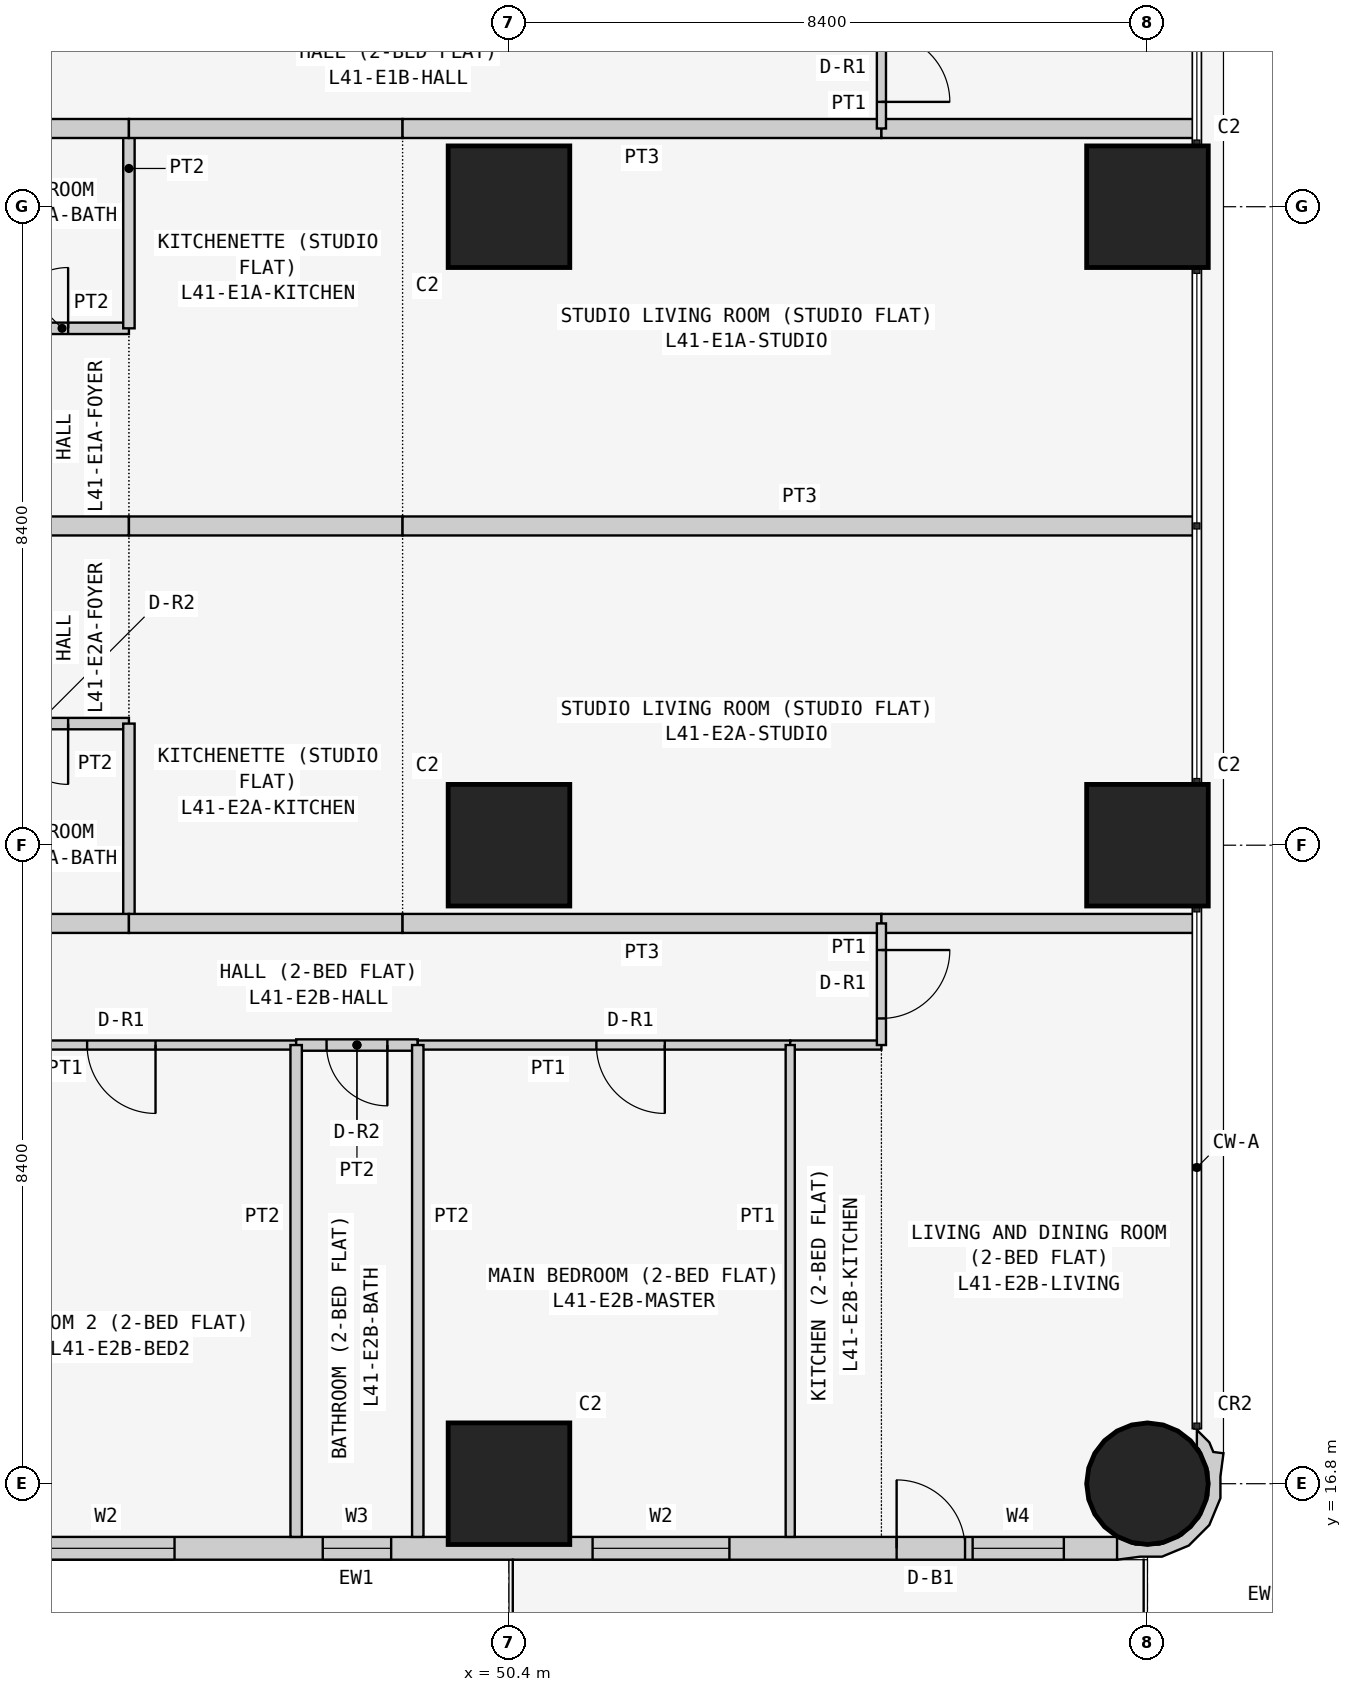
"""IFC4 building model, lengths in metres.
Left out: names, types, materials, properties, quantities, classifications, styles, units other than length and angle.
Written with IfcOpenShell. Run it as: python <this file> out.ifc"""

import sys

from ifc_helpers import new_model, si_unit, direction, frame, frame_2d, origin, origin_2d, place, context, subcontext, project, spatial, polyline, rectangle, circle, outline, extrude, element, fill, save


model = new_model("IFC4")
c1 = context("Model", 3, precision=1e-05, world=origin(), true_north=direction((0.0, 1.0)))
c2 = subcontext(c1, "Body", "Model", "MODEL_VIEW")
j1 = project(units=[si_unit("LENGTHUNIT", "METRE"), si_unit("PLANEANGLEUNIT", "RADIAN")], contexts=[c1])
p1 = place(None, origin())
s1 = spatial("IfcSite", under=j1, at=p1, CompositionType="ELEMENT")
p2 = place(p1, origin())
s2 = spatial("IfcBuilding", under=s1, at=p2, CompositionType="ELEMENT")
p3 = place(p2, frame((0.0, 0.0, 159.3)))
s3 = spatial("IfcBuildingStorey", under=s2, at=p3, CompositionType="ELEMENT", Elevation=159.3)
for number, where, z_axis, x_axis in (
    (1, (50.4, 16.8, 0.0), (0.0, 0.0, 1.0), (1.0, 0.0, 0.0)),
    (2, (50.4, 25.2, 0.0), (0.0, 0.0, 1.0), (1.0, 0.0, 0.0)),
    (3, (50.4, 33.6, 0.0), (0.0, 0.0, 1.0), (1.0, 0.0, 0.0)),
):
    element("IfcColumn", number, at=place(p3, frame(where, z_axis=z_axis, x_axis=x_axis)), inside=s3, PredefinedType="COLUMN", context=c2, shape_type="SweptSolid", body=[
        extrude(rectangle(XDim=1.6, YDim=1.6, at=origin_2d()), origin(), (0.0, 0.0, 1.0), 3.6),
    ])
p4 = place(p3, frame((58.8, 16.8, 0.0), z_axis=(0.0, 0.0, 1.0), x_axis=(1.0, 0.0, 0.0)))
e4 = element("IfcColumn", 4, at=p4, inside=s3, PredefinedType="COLUMN", context=c2, shape_type="SweptSolid", body=[
    extrude(circle(Radius=0.8, at=origin_2d()), origin(), (0.0, 0.0, 1.0), 3.6),
])
for number, where, z_axis, x_axis in (
    (5, (58.8, 25.2, 0.0), (0.0, 0.0, 1.0), (1.0, 0.0, 0.0)),
    (6, (58.8, 33.6, 0.0), (0.0, 0.0, 1.0), (1.0, 0.0, 0.0)),
):
    element("IfcColumn", number, at=place(p3, frame(where, z_axis=z_axis, x_axis=x_axis)), inside=s3, PredefinedType="COLUMN", context=c2, shape_type="SweptSolid", body=[
        extrude(rectangle(XDim=1.6, YDim=1.6, at=origin_2d()), origin(), (0.0, 0.0, 1.0), 3.6),
    ])
p5 = place(p3, frame((43.0, 15.95, 0.0), z_axis=(0.0, 0.0, 1.0), x_axis=(1.0, 0.0, 0.0)))
e7 = element("IfcWall", 7, at=p5, inside=s3, PredefinedType="SOLIDWALL", context=c2, shape_type="SweptSolid", body=[
    extrude(rectangle(XDim=15.4, YDim=0.3, at=frame_2d((7.7, 0.0))), origin(), (0.0, 0.0, 1.0), 3.45),
])
p6 = place(p5, frame((1.2, 0.0, 0.9)))
e8 = element("IfcOpeningElement", 8, at=p6, cuts=e7, PredefinedType="OPENING", context=c2, shape_type="SweptSolid", body=[
    extrude(rectangle(XDim=1.8, YDim=1.5, at=frame_2d((0.9, 0.75))), frame((0.0, 0.16, 0.0), z_axis=(0.0, -1.0, 0.0), x_axis=(1.0, 0.0, 0.0)), (0.0, 0.0, 1.0), 0.32),
])
p7 = place(p5, frame((4.95, 0.0, 1.5)))
e9 = element("IfcOpeningElement", 9, at=p7, cuts=e7, PredefinedType="OPENING", context=c2, shape_type="SweptSolid", body=[
    extrude(rectangle(XDim=0.9, YDim=0.7, at=frame_2d((0.45, 0.35))), frame((0.0, 0.16, 0.0), z_axis=(0.0, -1.0, 0.0), x_axis=(1.0, 0.0, 0.0)), (0.0, 0.0, 1.0), 0.32),
])
p8 = place(p5, frame((8.5, 0.0, 0.9)))
e10 = element("IfcOpeningElement", 10, at=p8, cuts=e7, PredefinedType="OPENING", context=c2, shape_type="SweptSolid", body=[
    extrude(rectangle(XDim=1.8, YDim=1.5, at=frame_2d((0.9, 0.75))), frame((0.0, 0.16, 0.0), z_axis=(0.0, -1.0, 0.0), x_axis=(1.0, 0.0, 0.0)), (0.0, 0.0, 1.0), 0.32),
])
p9 = place(p5, frame((12.5, 0.0, 0.0)))
e11 = element("IfcOpeningElement", 11, at=p9, cuts=e7, PredefinedType="OPENING", context=c2, shape_type="SweptSolid", body=[
    extrude(rectangle(XDim=0.9, YDim=2.4, at=frame_2d((0.45, 1.2))), frame((0.0, 0.16, 0.0), z_axis=(0.0, -1.0, 0.0), x_axis=(1.0, 0.0, 0.0)), (0.0, 0.0, 1.0), 0.32),
])
p10 = place(p5, frame((13.5, 0.0, 0.9)))
e12 = element("IfcOpeningElement", 12, at=p10, cuts=e7, PredefinedType="OPENING", context=c2, shape_type="SweptSolid", body=[
    extrude(rectangle(XDim=1.2, YDim=1.5, at=frame_2d((0.6, 0.75))), frame((0.0, 0.16, 0.0), z_axis=(0.0, -1.0, 0.0), x_axis=(1.0, 0.0, 0.0)), (0.0, 0.0, 1.0), 0.32),
])
p11 = place(p3, frame((58.473, 15.983, 0.0), z_axis=(0.0, 0.0, 1.0), x_axis=(0.93923434088, -0.343276641956, 0.0)))
e13 = element("IfcWall", 13, at=p11, inside=s3, PredefinedType="SOLIDWALL", context=c2, shape_type="SweptSolid", body=[
    extrude(outline(polyline([(0.828, 1.599), (0.697, 1.569), (0.604, 1.67), (0.394, 1.767), (0.471, 1.556), (0.508, 1.539), (0.724, 1.304), (0.834, 1.005), (0.82, 0.686), (0.686, 0.397), (0.451, 0.182), (0.152, 0.073), (-0.116, 0.084), (-0.127, 0.078), (-0.146, 0.071), (-0.006, -0.197), (0.266, -0.055), (0.535, 0.044), (0.817, 0.302), (0.978, 0.648), (0.994, 1.03), (0.895, 1.3), (0.828, 1.599)])), origin(), (0.0, 0.0, 1.0), 3.45),
])
p12 = place(p3, frame((45.4, 32.0, 0.0), z_axis=(0.0, 0.0, 1.0), x_axis=(-1.0, 0.0, 0.0)))
e14 = element("IfcWall", 14, at=p12, inside=s3, PredefinedType="PARTITIONING", context=c2, shape_type="SweptSolid", body=[
    extrude(rectangle(XDim=2.475, YDim=0.15, at=frame_2d((1.237, 0.0))), origin(), (0.0, 0.0, 1.0), 3.45),
])
p13 = place(p12, frame((0.8, 0.0, 0.0)))
e15 = element("IfcOpeningElement", 15, at=p13, cuts=e14, PredefinedType="OPENING", context=c2, shape_type="SweptSolid", body=[
    extrude(rectangle(XDim=0.8, YDim=2.1, at=frame_2d((0.4, 1.05))), frame((0.0, 0.085, 0.0), z_axis=(0.0, -1.0, 0.0), x_axis=(1.0, 0.0, 0.0)), (0.0, 0.0, 1.0), 0.17),
])
p14 = place(p3, frame((42.925, 29.4, 0.0), z_axis=(0.0, 0.0, 1.0), x_axis=(1.0, 0.0, 0.0)))
e16 = element("IfcWall", 16, at=p14, inside=s3, PredefinedType="PARTITIONING", context=c2, shape_type="SweptSolid", body=[
    extrude(rectangle(XDim=2.475, YDim=0.25, at=frame_2d((1.237, 0.0))), origin(), (0.0, 0.0, 1.0), 3.45),
])
p15 = place(p3, frame((45.4, 32.0, 0.0), z_axis=(0.0, 0.0, 1.0), x_axis=(0.0, 1.0, 0.0)))
e17 = element("IfcWall", 17, at=p15, inside=s3, PredefinedType="PARTITIONING", context=c2, shape_type="SweptSolid", body=[
    extrude(rectangle(XDim=2.629, YDim=0.15, at=frame_2d((1.314, 0.0))), origin(), (0.0, 0.0, 1.0), 3.45),
])
p16 = place(p3, frame((45.4, 34.629, 0.0), z_axis=(0.0, 0.0, 1.0), x_axis=(-1.0, 0.0, 0.0)))
e18 = element("IfcWall", 18, at=p16, inside=s3, PredefinedType="PARTITIONING", context=c2, shape_type="SweptSolid", body=[
    extrude(rectangle(XDim=2.475, YDim=0.25, at=frame_2d((1.237, 0.0))), origin(), (0.0, 0.0, 1.0), 3.45),
])
for number, where, z_axis, x_axis in (
    (19, (49.0, 34.629, 0.0), (0.0, 0.0, 1.0), (-1.0, 0.0, 0.0)),
    (20, (45.4, 29.4, 0.0), (0.0, 0.0, 1.0), (1.0, 0.0, 0.0)),
):
    element("IfcWall", number, at=place(p3, frame(where, z_axis=z_axis, x_axis=x_axis)), inside=s3, PredefinedType="PARTITIONING", context=c2, shape_type="SweptSolid", body=[
        extrude(rectangle(XDim=3.6, YDim=0.25, at=frame_2d((1.8, 0.0))), origin(), (0.0, 0.0, 1.0), 3.45),
    ])
p17 = place(p3, frame((55.3, 34.629, 0.0), z_axis=(0.0, 0.0, 1.0), x_axis=(-1.0, 0.0, 0.0)))
e21 = element("IfcWall", 21, at=p17, inside=s3, PredefinedType="PARTITIONING", context=c2, shape_type="SweptSolid", body=[
    extrude(rectangle(XDim=6.3, YDim=0.25, at=frame_2d((3.15, 0.0))), origin(), (0.0, 0.0, 1.0), 3.45),
])
p18 = place(p3, frame((59.45, 34.629, 0.0), z_axis=(0.0, 0.0, 1.0), x_axis=(-1.0, 0.0, 0.0)))
e22 = element("IfcWall", 22, at=p18, inside=s3, PredefinedType="PARTITIONING", context=c2, shape_type="SweptSolid", body=[
    extrude(rectangle(XDim=4.15, YDim=0.25, at=frame_2d((2.075, 0.0))), origin(), (0.0, 0.0, 1.0), 3.45),
])
p19 = place(p3, frame((49.0, 29.4, 0.0), z_axis=(0.0, 0.0, 1.0), x_axis=(1.0, 0.0, 0.0)))
e23 = element("IfcWall", 23, at=p19, inside=s3, PredefinedType="PARTITIONING", context=c2, shape_type="SweptSolid", body=[
    extrude(rectangle(XDim=10.45, YDim=0.25, at=frame_2d((5.225, 0.0))), origin(), (0.0, 0.0, 1.0), 3.45),
])
p20 = place(p3, frame((55.3, 34.629, 0.0), z_axis=(0.0, 0.0, 1.0), x_axis=(0.0, 1.0, 0.0)))
e24 = element("IfcWall", 24, at=p20, inside=s3, PredefinedType="PARTITIONING", context=c2, shape_type="SweptSolid", body=[
    extrude(rectangle(XDim=1.6, YDim=0.12, at=frame_2d((0.8, 0.0))), origin(), (0.0, 0.0, 1.0), 3.45),
])
p21 = place(p20, frame((0.35, 0.0, 0.0)))
e25 = element("IfcOpeningElement", 25, at=p21, cuts=e24, PredefinedType="OPENING", context=c2, shape_type="SweptSolid", body=[
    extrude(rectangle(XDim=0.9, YDim=2.1, at=frame_2d((0.45, 1.05))), frame((0.0, 0.07, 0.0), z_axis=(0.0, -1.0, 0.0), x_axis=(1.0, 0.0, 0.0)), (0.0, 0.0, 1.0), 0.14),
])
p22 = place(p3, frame((45.4, 26.8, 0.0), z_axis=(0.0, 0.0, 1.0), x_axis=(-1.0, 0.0, 0.0)))
e26 = element("IfcWall", 26, at=p22, inside=s3, PredefinedType="PARTITIONING", context=c2, shape_type="SweptSolid", body=[
    extrude(rectangle(XDim=2.475, YDim=0.15, at=frame_2d((1.237, 0.0))), origin(), (0.0, 0.0, 1.0), 3.45),
])
p23 = place(p22, frame((0.8, 0.0, 0.0)))
e27 = element("IfcOpeningElement", 27, at=p23, cuts=e26, PredefinedType="OPENING", context=c2, shape_type="SweptSolid", body=[
    extrude(rectangle(XDim=0.8, YDim=2.1, at=frame_2d((0.4, 1.05))), frame((0.0, 0.085, 0.0), z_axis=(0.0, -1.0, 0.0), x_axis=(1.0, 0.0, 0.0)), (0.0, 0.0, 1.0), 0.17),
])
p24 = place(p3, frame((45.4, 26.8, 0.0), z_axis=(0.0, 0.0, 1.0), x_axis=(0.0, -1.0, 0.0)))
e28 = element("IfcWall", 28, at=p24, inside=s3, PredefinedType="PARTITIONING", context=c2, shape_type="SweptSolid", body=[
    extrude(rectangle(XDim=2.629, YDim=0.15, at=frame_2d((1.314, 0.0))), origin(), (0.0, 0.0, 1.0), 3.45),
])
p25 = place(p3, frame((45.4, 24.171, 0.0), z_axis=(0.0, 0.0, 1.0), x_axis=(-1.0, 0.0, 0.0)))
e29 = element("IfcWall", 29, at=p25, inside=s3, PredefinedType="PARTITIONING", context=c2, shape_type="SweptSolid", body=[
    extrude(rectangle(XDim=2.475, YDim=0.25, at=frame_2d((1.237, 0.0))), origin(), (0.0, 0.0, 1.0), 3.45),
])
p26 = place(p3, frame((49.0, 24.171, 0.0), z_axis=(0.0, 0.0, 1.0), x_axis=(-1.0, 0.0, 0.0)))
e30 = element("IfcWall", 30, at=p26, inside=s3, PredefinedType="PARTITIONING", context=c2, shape_type="SweptSolid", body=[
    extrude(rectangle(XDim=3.6, YDim=0.25, at=frame_2d((1.8, 0.0))), origin(), (0.0, 0.0, 1.0), 3.45),
])
p27 = place(p3, frame((55.3, 24.171, 0.0), z_axis=(0.0, 0.0, 1.0), x_axis=(-1.0, 0.0, 0.0)))
e31 = element("IfcWall", 31, at=p27, inside=s3, PredefinedType="PARTITIONING", context=c2, shape_type="SweptSolid", body=[
    extrude(rectangle(XDim=6.3, YDim=0.25, at=frame_2d((3.15, 0.0))), origin(), (0.0, 0.0, 1.0), 3.45),
])
p28 = place(p3, frame((59.45, 24.171, 0.0), z_axis=(0.0, 0.0, 1.0), x_axis=(-1.0, 0.0, 0.0)))
e32 = element("IfcWall", 32, at=p28, inside=s3, PredefinedType="PARTITIONING", context=c2, shape_type="SweptSolid", body=[
    extrude(rectangle(XDim=4.15, YDim=0.25, at=frame_2d((2.075, 0.0))), origin(), (0.0, 0.0, 1.0), 3.45),
])
p29 = place(p3, frame((47.6, 22.571, 0.0), z_axis=(0.0, 0.0, 1.0), x_axis=(-1.0, 0.0, 0.0)))
e33 = element("IfcWall", 33, at=p29, inside=s3, PredefinedType="PARTITIONING", context=c2, shape_type="SweptSolid", body=[
    extrude(rectangle(XDim=4.675, YDim=0.12, at=frame_2d((2.337, 0.0))), origin(), (0.0, 0.0, 1.0), 3.45),
])
p30 = place(p29, frame((1.85, 0.0, 0.0)))
e34 = element("IfcOpeningElement", 34, at=p30, cuts=e33, PredefinedType="OPENING", context=c2, shape_type="SweptSolid", body=[
    extrude(rectangle(XDim=0.9, YDim=2.1, at=frame_2d((0.45, 1.05))), frame((0.0, 0.07, 0.0), z_axis=(0.0, -1.0, 0.0), x_axis=(1.0, 0.0, 0.0)), (0.0, 0.0, 1.0), 0.14),
])
p31 = place(p3, frame((49.2, 22.571, 0.0), z_axis=(0.0, 0.0, 1.0), x_axis=(-1.0, 0.0, 0.0)))
e35 = element("IfcWall", 35, at=p31, inside=s3, PredefinedType="PARTITIONING", context=c2, shape_type="SweptSolid", body=[
    extrude(rectangle(XDim=1.6, YDim=0.15, at=frame_2d((0.8, 0.0))), origin(), (0.0, 0.0, 1.0), 3.45),
])
p32 = place(p31, frame((0.4, 0.0, 0.0)))
e36 = element("IfcOpeningElement", 36, at=p32, cuts=e35, PredefinedType="OPENING", context=c2, shape_type="SweptSolid", body=[
    extrude(rectangle(XDim=0.8, YDim=2.1, at=frame_2d((0.4, 1.05))), frame((0.0, 0.085, 0.0), z_axis=(0.0, -1.0, 0.0), x_axis=(1.0, 0.0, 0.0)), (0.0, 0.0, 1.0), 0.17),
])
p33 = place(p3, frame((54.1, 22.571, 0.0), z_axis=(0.0, 0.0, 1.0), x_axis=(-1.0, 0.0, 0.0)))
e37 = element("IfcWall", 37, at=p33, inside=s3, PredefinedType="PARTITIONING", context=c2, shape_type="SweptSolid", body=[
    extrude(rectangle(XDim=4.9, YDim=0.12, at=frame_2d((2.45, 0.0))), origin(), (0.0, 0.0, 1.0), 3.45),
])
p34 = place(p33, frame((1.65, 0.0, 0.0)))
e38 = element("IfcOpeningElement", 38, at=p34, cuts=e37, PredefinedType="OPENING", context=c2, shape_type="SweptSolid", body=[
    extrude(rectangle(XDim=0.9, YDim=2.1, at=frame_2d((0.45, 1.05))), frame((0.0, 0.07, 0.0), z_axis=(0.0, -1.0, 0.0), x_axis=(1.0, 0.0, 0.0)), (0.0, 0.0, 1.0), 0.14),
])
p35 = place(p3, frame((55.3, 22.571, 0.0), z_axis=(0.0, 0.0, 1.0), x_axis=(-1.0, 0.0, 0.0)))
e39 = element("IfcWall", 39, at=p35, inside=s3, PredefinedType="PARTITIONING", context=c2, shape_type="SweptSolid", body=[
    extrude(rectangle(XDim=1.2, YDim=0.12, at=frame_2d((0.6, 0.0))), origin(), (0.0, 0.0, 1.0), 3.45),
])
p36 = place(p3, frame((55.3, 24.171, 0.0), z_axis=(0.0, 0.0, 1.0), x_axis=(0.0, -1.0, 0.0)))
e40 = element("IfcWall", 40, at=p36, inside=s3, PredefinedType="PARTITIONING", context=c2, shape_type="SweptSolid", body=[
    extrude(rectangle(XDim=1.6, YDim=0.12, at=frame_2d((0.8, 0.0))), origin(), (0.0, 0.0, 1.0), 3.45),
])
p37 = place(p36, frame((0.35, 0.0, 0.0)))
e41 = element("IfcOpeningElement", 41, at=p37, cuts=e40, PredefinedType="OPENING", context=c2, shape_type="SweptSolid", body=[
    extrude(rectangle(XDim=0.9, YDim=2.1, at=frame_2d((0.45, 1.05))), frame((0.0, 0.07, 0.0), z_axis=(0.0, -1.0, 0.0), x_axis=(1.0, 0.0, 0.0)), (0.0, 0.0, 1.0), 0.14),
])
for number, where, z_axis, x_axis in (
    (42, (47.6, 22.571, 0.0), (0.0, 0.0, 1.0), (0.0, -1.0, 0.0)),
    (43, (49.2, 22.571, 0.0), (0.0, 0.0, 1.0), (0.0, -1.0, 0.0)),
):
    element("IfcWall", number, at=place(p3, frame(where, z_axis=z_axis, x_axis=x_axis)), inside=s3, PredefinedType="PARTITIONING", context=c2, shape_type="SweptSolid", body=[
        extrude(rectangle(XDim=6.471, YDim=0.15, at=frame_2d((3.235, 0.0))), origin(), (0.0, 0.0, 1.0), 3.45),
    ])
p38 = place(p3, frame((54.1, 22.571, 0.0), z_axis=(0.0, 0.0, 1.0), x_axis=(0.0, -1.0, 0.0)))
e44 = element("IfcWall", 44, at=p38, inside=s3, PredefinedType="PARTITIONING", context=c2, shape_type="SweptSolid", body=[
    extrude(rectangle(XDim=6.471, YDim=0.12, at=frame_2d((3.235, 0.0))), origin(), (0.0, 0.0, 1.0), 3.45),
])
p39 = place(p6, origin())
e45 = element("IfcWindow", 45, at=p39, inside=s3, PartitioningType="SINGLE_PANEL", PredefinedType="WINDOW", context=c2, shape_type="SweptSolid", body=[
    extrude(rectangle(XDim=1.8, YDim=1.5, at=frame_2d((0.9, 0.75))), frame((0.0, 0.03, 0.0), z_axis=(0.0, -1.0, 0.0), x_axis=(1.0, 0.0, 0.0)), (0.0, 0.0, 1.0), 0.06),
])
fill(e8, e45)
p40 = place(p7, origin())
e46 = element("IfcWindow", 46, at=p40, inside=s3, PartitioningType="SINGLE_PANEL", PredefinedType="WINDOW", context=c2, shape_type="SweptSolid", body=[
    extrude(rectangle(XDim=0.9, YDim=0.7, at=frame_2d((0.45, 0.35))), frame((0.0, 0.03, 0.0), z_axis=(0.0, -1.0, 0.0), x_axis=(1.0, 0.0, 0.0)), (0.0, 0.0, 1.0), 0.06),
])
fill(e9, e46)
p41 = place(p8, origin())
e47 = element("IfcWindow", 47, at=p41, inside=s3, PartitioningType="SINGLE_PANEL", PredefinedType="WINDOW", context=c2, shape_type="SweptSolid", body=[
    extrude(rectangle(XDim=1.8, YDim=1.5, at=frame_2d((0.9, 0.75))), frame((0.0, 0.03, 0.0), z_axis=(0.0, -1.0, 0.0), x_axis=(1.0, 0.0, 0.0)), (0.0, 0.0, 1.0), 0.06),
])
fill(e10, e47)
p42 = place(p9, origin())
e48 = element("IfcDoor", 48, at=p42, inside=s3, OperationType="SINGLE_SWING_LEFT", PredefinedType="DOOR", context=c2, shape_type="SweptSolid", body=[
    extrude(rectangle(XDim=0.9, YDim=2.4, at=frame_2d((0.45, 1.2))), frame((0.0, 0.025, 0.0), z_axis=(0.0, -1.0, 0.0), x_axis=(1.0, 0.0, 0.0)), (0.0, 0.0, 1.0), 0.05),
])
fill(e11, e48)
p43 = place(p10, origin())
e49 = element("IfcWindow", 49, at=p43, inside=s3, PartitioningType="SINGLE_PANEL", PredefinedType="WINDOW", context=c2, shape_type="SweptSolid", body=[
    extrude(rectangle(XDim=1.2, YDim=1.5, at=frame_2d((0.6, 0.75))), frame((0.0, 0.03, 0.0), z_axis=(0.0, -1.0, 0.0), x_axis=(1.0, 0.0, 0.0)), (0.0, 0.0, 1.0), 0.06),
])
fill(e12, e49)
p44 = place(p13, frame((0.8, 0.0, 0.0), z_axis=(0.0, 0.0, 1.0), x_axis=(-1.0, 0.0, 0.0)))
e50 = element("IfcDoor", 50, at=p44, inside=s3, OperationType="SINGLE_SWING_RIGHT", PredefinedType="DOOR", context=c2, shape_type="SweptSolid", body=[
    extrude(rectangle(XDim=0.8, YDim=2.1, at=frame_2d((0.4, 1.05))), frame((0.0, 0.025, 0.0), z_axis=(0.0, -1.0, 0.0), x_axis=(1.0, 0.0, 0.0)), (0.0, 0.0, 1.0), 0.05),
])
fill(e15, e50)
p45 = place(p21, frame((0.9, 0.0, 0.0), z_axis=(0.0, 0.0, 1.0), x_axis=(-1.0, 0.0, 0.0)))
e51 = element("IfcDoor", 51, at=p45, inside=s3, OperationType="SINGLE_SWING_RIGHT", PredefinedType="DOOR", context=c2, shape_type="SweptSolid", body=[
    extrude(rectangle(XDim=0.9, YDim=2.1, at=frame_2d((0.45, 1.05))), frame((0.0, 0.025, 0.0), z_axis=(0.0, -1.0, 0.0), x_axis=(1.0, 0.0, 0.0)), (0.0, 0.0, 1.0), 0.05),
])
fill(e25, e51)
p46 = place(p23, origin())
e52 = element("IfcDoor", 52, at=p46, inside=s3, OperationType="SINGLE_SWING_LEFT", PredefinedType="DOOR", context=c2, shape_type="SweptSolid", body=[
    extrude(rectangle(XDim=0.8, YDim=2.1, at=frame_2d((0.4, 1.05))), frame((0.0, 0.025, 0.0), z_axis=(0.0, -1.0, 0.0), x_axis=(1.0, 0.0, 0.0)), (0.0, 0.0, 1.0), 0.05),
])
fill(e27, e52)
p47 = place(p30, origin())
e53 = element("IfcDoor", 53, at=p47, inside=s3, OperationType="SINGLE_SWING_LEFT", PredefinedType="DOOR", context=c2, shape_type="SweptSolid", body=[
    extrude(rectangle(XDim=0.9, YDim=2.1, at=frame_2d((0.45, 1.05))), frame((0.0, 0.025, 0.0), z_axis=(0.0, -1.0, 0.0), x_axis=(1.0, 0.0, 0.0)), (0.0, 0.0, 1.0), 0.05),
])
fill(e34, e53)
p48 = place(p32, origin())
e54 = element("IfcDoor", 54, at=p48, inside=s3, OperationType="SINGLE_SWING_LEFT", PredefinedType="DOOR", context=c2, shape_type="SweptSolid", body=[
    extrude(rectangle(XDim=0.8, YDim=2.1, at=frame_2d((0.4, 1.05))), frame((0.0, 0.025, 0.0), z_axis=(0.0, -1.0, 0.0), x_axis=(1.0, 0.0, 0.0)), (0.0, 0.0, 1.0), 0.05),
])
fill(e36, e54)
p49 = place(p34, origin())
e55 = element("IfcDoor", 55, at=p49, inside=s3, OperationType="SINGLE_SWING_LEFT", PredefinedType="DOOR", context=c2, shape_type="SweptSolid", body=[
    extrude(rectangle(XDim=0.9, YDim=2.1, at=frame_2d((0.45, 1.05))), frame((0.0, 0.025, 0.0), z_axis=(0.0, -1.0, 0.0), x_axis=(1.0, 0.0, 0.0)), (0.0, 0.0, 1.0), 0.05),
])
fill(e38, e55)
p50 = place(p37, origin())
e56 = element("IfcDoor", 56, at=p50, inside=s3, OperationType="SINGLE_SWING_LEFT", PredefinedType="DOOR", context=c2, shape_type="SweptSolid", body=[
    extrude(rectangle(XDim=0.9, YDim=2.1, at=frame_2d((0.45, 1.05))), frame((0.0, 0.025, 0.0), z_axis=(0.0, -1.0, 0.0), x_axis=(1.0, 0.0, 0.0)), (0.0, 0.0, 1.0), 0.05),
])
fill(e41, e56)
save(model, sys.argv[1])
